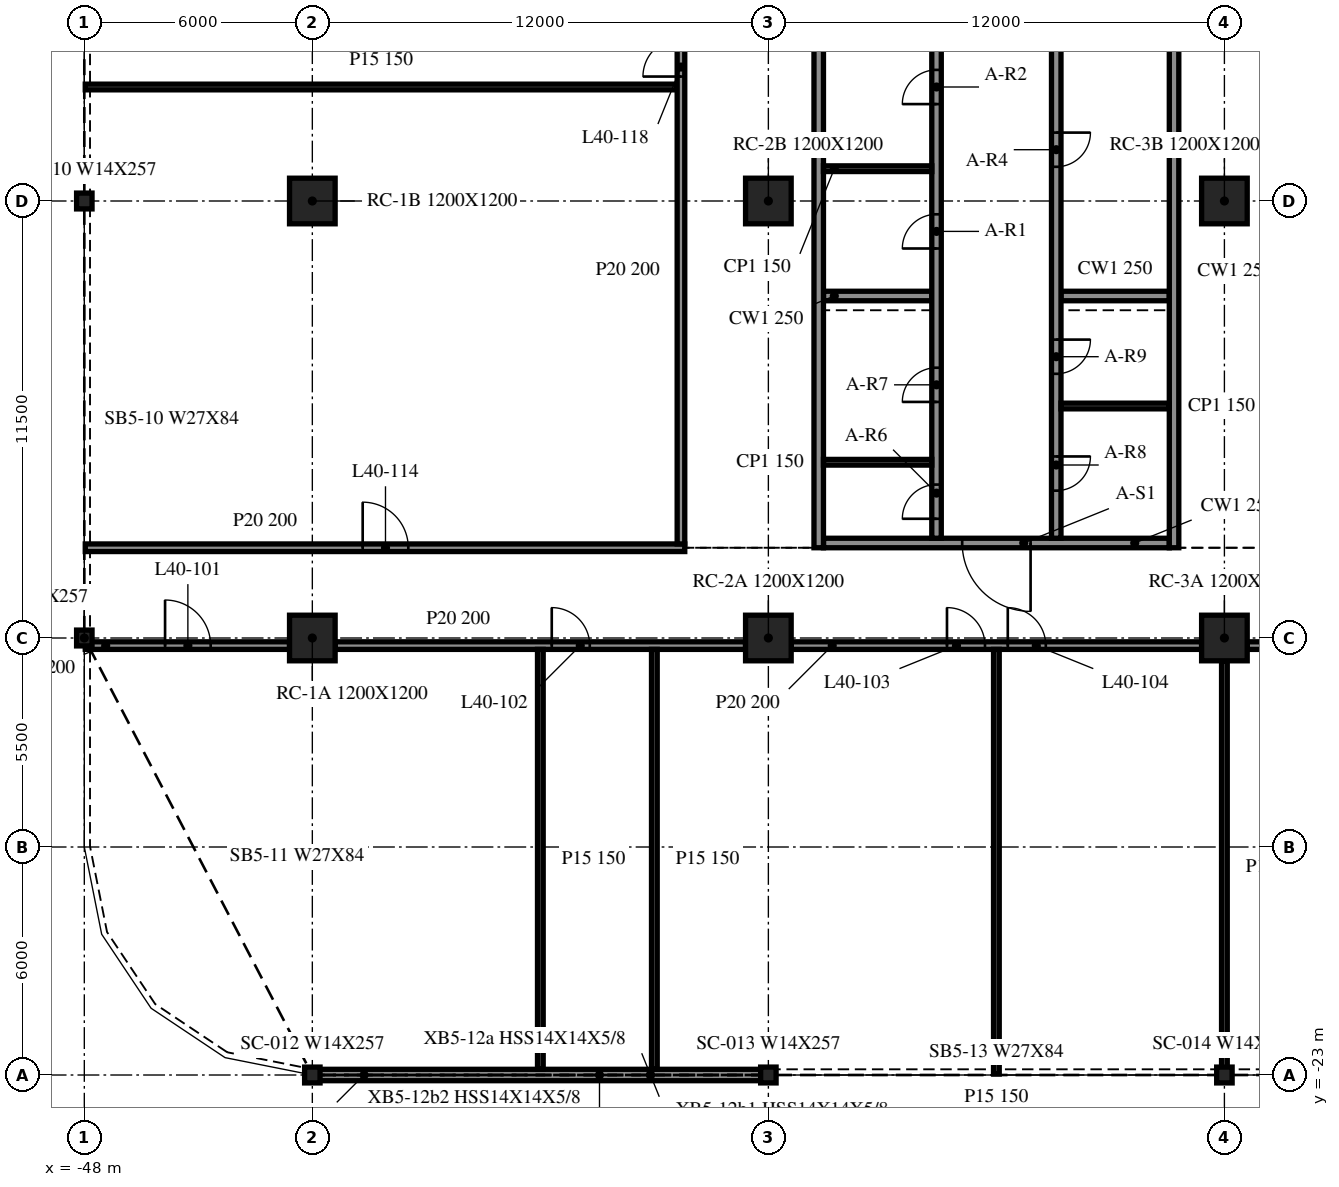
"""IFC4 building model, lengths in metres.
Left out: names, types, materials, properties, quantities, classifications, styles, units other than length and angle.
Written with IfcOpenShell. Run it as: python <this file> out.ifc"""

import sys

from ifc_helpers import new_model, si_unit, direction, frame, frame_2d, origin, origin_2d, place, context, subcontext, project, spatial, rectangle, i_section, extrude, element, fill, save


model = new_model("IFC4")
c1 = context("Model", 3, precision=1e-05, world=origin(), true_north=direction((0.0, 1.0)))
c2 = subcontext(c1, "Body", "Model", "MODEL_VIEW")
j1 = project(units=[si_unit("LENGTHUNIT", "METRE"), si_unit("PLANEANGLEUNIT", "RADIAN")], contexts=[c1])
p1 = place(None, origin())
s1 = spatial("IfcSite", under=j1, at=p1, CompositionType="ELEMENT")
p2 = place(p1, origin())
s2 = spatial("IfcBuilding", under=s1, at=p2, CompositionType="ELEMENT")
p3 = place(p2, frame((0.0, 0.0, 170.6)))
s3 = spatial("IfcBuildingStorey", under=s2, at=p3, CompositionType="ELEMENT", Elevation=170.6)
for number, where, z_axis, x_axis in (
    (1, (-42.0, -11.5, -0.34), (0.0, 0.0, 1.0), (1.0, 0.0, 0.0)),
    (2, (-42.0, 0.0, -0.34), (0.0, 0.0, 1.0), (1.0, 0.0, 0.0)),
    (3, (-30.0, -11.5, -0.34), (0.0, 0.0, 1.0), (1.0, 0.0, 0.0)),
    (4, (-30.0, 0.0, -0.34), (0.0, 0.0, 1.0), (1.0, 0.0, 0.0)),
    (5, (-18.0, -11.5, -0.34), (0.0, 0.0, 1.0), (1.0, 0.0, 0.0)),
    (6, (-18.0, 0.0, -0.34), (0.0, 0.0, 1.0), (1.0, 0.0, 0.0)),
):
    element("IfcColumn", number, at=place(p3, frame(where, z_axis=z_axis, x_axis=x_axis)), inside=s3, PredefinedType="COLUMN", context=c2, shape_type="SweptSolid", body=[
        extrude(rectangle(XDim=1.2, YDim=1.2, at=origin_2d()), origin(), (0.0, 0.0, 1.0), 3.8),
    ])
for number, where, z_axis, x_axis in (
    (7, (-48.0, 0.0, -0.34), (0.0, 0.0, 1.0), (1.0, 0.0, 0.0)),
    (8, (-48.0, -11.5, -0.34), (0.0, 0.0, 1.0), (1.0, 0.0, 0.0)),
    (9, (-42.0, -23.0, -0.34), (0.0, 0.0, 1.0), (1.0, 0.0, 0.0)),
    (10, (-30.0, -23.0, -0.34), (0.0, 0.0, 1.0), (1.0, 0.0, 0.0)),
    (11, (-18.0, -23.0, -0.34), (0.0, 0.0, 1.0), (1.0, 0.0, 0.0)),
):
    element("IfcColumn", number, at=place(p3, frame(where, z_axis=z_axis, x_axis=x_axis)), inside=s3, PredefinedType="COLUMN", context=c2, shape_type="SweptSolid", body=[
        extrude(i_section(OverallWidth=0.406, OverallDepth=0.417, WebThickness=0.03, FlangeThickness=0.048, at=origin_2d()), origin(), (0.0, 0.0, 1.0), 3.8),
    ])
p4 = place(p3, frame((-41.985, -23.0, 0.0), z_axis=(0.0, 0.0, 1.0), x_axis=(1.0, 0.0, 0.0)))
e12 = element("IfcWall", 12, at=p4, inside=s3, PredefinedType="NOTDEFINED", context=c2, shape_type="SweptSolid", body=[
    extrude(rectangle(XDim=11.97, YDim=0.3, at=frame_2d((5.985, 0.0))), origin(), (0.0, 0.0, 1.0), 2.782),
])
for number, where, z_axis, x_axis in (
    (13, (-28.675, 15.125, 0.0), (0.0, 0.0, 1.0), (0.0, -1.0, 0.0)),
    (14, (-19.325, -9.125, 0.0), (0.0, 0.0, 1.0), (0.0, 1.0, 0.0)),
):
    element("IfcWall", number, at=place(p3, frame(where, z_axis=z_axis, x_axis=x_axis)), inside=s3, PredefinedType="SOLIDWALL", context=c2, shape_type="SweptSolid", body=[
        extrude(rectangle(XDim=24.25, YDim=0.25, at=frame_2d((12.125, 0.0))), origin(), (0.0, 0.0, 1.0), 3.46),
    ])
p5 = place(p3, frame((-19.45, -9.0, 0.0), z_axis=(0.0, 0.0, 1.0), x_axis=(-1.0, 0.0, 0.0)))
e15 = element("IfcWall", 15, at=p5, inside=s3, PredefinedType="SOLIDWALL", context=c2, shape_type="SweptSolid", body=[
    extrude(rectangle(XDim=9.1, YDim=0.25, at=frame_2d((4.55, 0.0))), origin(), (0.0, 0.0, 1.0), 3.46),
])
p6 = place(p5, frame((3.65, 0.0, 0.0)))
e16 = element("IfcOpeningElement", 16, at=p6, cuts=e15, PredefinedType="OPENING", context=c2, shape_type="SweptSolid", body=[
    extrude(rectangle(XDim=1.8, YDim=2.1, at=frame_2d((0.9, 1.05))), frame((0.0, 0.135, 0.0), z_axis=(0.0, -1.0, 0.0), x_axis=(1.0, 0.0, 0.0)), (0.0, 0.0, 1.0), 0.27),
])
p7 = place(p3, frame((-25.575, -8.875, 0.0), z_axis=(0.0, 0.0, 1.0), x_axis=(0.0, 1.0, 0.0)))
e17 = element("IfcWall", 17, at=p7, inside=s3, PredefinedType="SOLIDWALL", context=c2, shape_type="SweptSolid", body=[
    extrude(rectangle(XDim=17.5, YDim=0.25, at=frame_2d((8.75, 0.0))), origin(), (0.0, 0.0, 1.0), 3.46),
])
p8 = place(p7, frame((7.625, 0.0, 0.0)))
e18 = element("IfcOpeningElement", 18, at=p8, cuts=e17, PredefinedType="OPENING", context=c2, shape_type="SweptSolid", body=[
    extrude(rectangle(XDim=0.9, YDim=2.1, at=frame_2d((0.45, 1.05))), frame((0.0, 0.135, 0.0), z_axis=(0.0, -1.0, 0.0), x_axis=(1.0, 0.0, 0.0)), (0.0, 0.0, 1.0), 0.27),
])
p9 = place(p7, frame((11.425, 0.0, 0.0)))
e19 = element("IfcOpeningElement", 19, at=p9, cuts=e17, PredefinedType="OPENING", context=c2, shape_type="SweptSolid", body=[
    extrude(rectangle(XDim=0.9, YDim=2.1, at=frame_2d((0.45, 1.05))), frame((0.0, 0.135, 0.0), z_axis=(0.0, -1.0, 0.0), x_axis=(1.0, 0.0, 0.0)), (0.0, 0.0, 1.0), 0.27),
])
p10 = place(p7, frame((15.225, 0.0, 0.0)))
e20 = element("IfcOpeningElement", 20, at=p10, cuts=e17, PredefinedType="OPENING", context=c2, shape_type="SweptSolid", body=[
    extrude(rectangle(XDim=0.9, YDim=2.1, at=frame_2d((0.45, 1.05))), frame((0.0, 0.135, 0.0), z_axis=(0.0, -1.0, 0.0), x_axis=(1.0, 0.0, 0.0)), (0.0, 0.0, 1.0), 0.27),
])
p11 = place(p7, frame((0.512, 0.0, 0.0)))
e21 = element("IfcOpeningElement", 21, at=p11, cuts=e17, PredefinedType="OPENING", context=c2, shape_type="SweptSolid", body=[
    extrude(rectangle(XDim=0.9, YDim=2.1, at=frame_2d((0.45, 1.05))), frame((0.0, 0.135, 0.0), z_axis=(0.0, -1.0, 0.0), x_axis=(1.0, 0.0, 0.0)), (0.0, 0.0, 1.0), 0.27),
])
p12 = place(p7, frame((3.587, 0.0, 0.0)))
e22 = element("IfcOpeningElement", 22, at=p12, cuts=e17, PredefinedType="OPENING", context=c2, shape_type="SweptSolid", body=[
    extrude(rectangle(XDim=0.9, YDim=2.1, at=frame_2d((0.45, 1.05))), frame((0.0, 0.135, 0.0), z_axis=(0.0, -1.0, 0.0), x_axis=(1.0, 0.0, 0.0)), (0.0, 0.0, 1.0), 0.27),
])
p13 = place(p3, frame((-22.425, 14.875, 0.0), z_axis=(0.0, 0.0, 1.0), x_axis=(0.0, -1.0, 0.0)))
e23 = element("IfcWall", 23, at=p13, inside=s3, PredefinedType="SOLIDWALL", context=c2, shape_type="SweptSolid", body=[
    extrude(rectangle(XDim=23.75, YDim=0.25, at=frame_2d((11.875, 0.0))), origin(), (0.0, 0.0, 1.0), 3.46),
])
p14 = place(p13, frame((13.075, 0.0, 0.0)))
e24 = element("IfcOpeningElement", 24, at=p14, cuts=e23, PredefinedType="OPENING", context=c2, shape_type="SweptSolid", body=[
    extrude(rectangle(XDim=0.9, YDim=2.1, at=frame_2d((0.45, 1.05))), frame((0.0, 0.135, 0.0), z_axis=(0.0, -1.0, 0.0), x_axis=(1.0, 0.0, 0.0)), (0.0, 0.0, 1.0), 0.27),
])
p15 = place(p13, frame((7.625, 0.0, 0.0)))
e25 = element("IfcOpeningElement", 25, at=p15, cuts=e23, PredefinedType="OPENING", context=c2, shape_type="SweptSolid", body=[
    extrude(rectangle(XDim=0.9, YDim=2.1, at=frame_2d((0.45, 1.05))), frame((0.0, 0.135, 0.0), z_axis=(0.0, -1.0, 0.0), x_axis=(1.0, 0.0, 0.0)), (0.0, 0.0, 1.0), 0.27),
])
p16 = place(p13, frame((21.597, 0.0, 0.0)))
e26 = element("IfcOpeningElement", 26, at=p16, cuts=e23, PredefinedType="OPENING", context=c2, shape_type="SweptSolid", body=[
    extrude(rectangle(XDim=0.9, YDim=2.1, at=frame_2d((0.45, 1.05))), frame((0.0, 0.135, 0.0), z_axis=(0.0, -1.0, 0.0), x_axis=(1.0, 0.0, 0.0)), (0.0, 0.0, 1.0), 0.27),
])
p17 = place(p13, frame((18.522, 0.0, 0.0)))
e27 = element("IfcOpeningElement", 27, at=p17, cuts=e23, PredefinedType="OPENING", context=c2, shape_type="SweptSolid", body=[
    extrude(rectangle(XDim=0.9, YDim=2.1, at=frame_2d((0.45, 1.05))), frame((0.0, 0.135, 0.0), z_axis=(0.0, -1.0, 0.0), x_axis=(1.0, 0.0, 0.0)), (0.0, 0.0, 1.0), 0.27),
])
p18 = place(p13, frame((4.087, 0.0, 0.0)))
e28 = element("IfcOpeningElement", 28, at=p18, cuts=e23, PredefinedType="OPENING", context=c2, shape_type="SweptSolid", body=[
    extrude(rectangle(XDim=0.9, YDim=2.1, at=frame_2d((0.45, 1.05))), frame((0.0, 0.135, 0.0), z_axis=(0.0, -1.0, 0.0), x_axis=(1.0, 0.0, 0.0)), (0.0, 0.0, 1.0), 0.27),
])
p19 = place(p13, frame((1.012, 0.0, 0.0)))
e29 = element("IfcOpeningElement", 29, at=p19, cuts=e23, PredefinedType="OPENING", context=c2, shape_type="SweptSolid", body=[
    extrude(rectangle(XDim=0.9, YDim=2.1, at=frame_2d((0.45, 1.05))), frame((0.0, 0.135, 0.0), z_axis=(0.0, -1.0, 0.0), x_axis=(1.0, 0.0, 0.0)), (0.0, 0.0, 1.0), 0.27),
])
for number, where, z_axis, x_axis in (
    (30, (-28.55, -2.5, 0.0), (0.0, 0.0, 1.0), (1.0, 0.0, 0.0)),
    (31, (-22.3, -2.5, 0.0), (0.0, 0.0, 1.0), (1.0, 0.0, 0.0)),
):
    element("IfcWall", number, at=place(p3, frame(where, z_axis=z_axis, x_axis=x_axis)), inside=s3, PredefinedType="SOLIDWALL", context=c2, shape_type="SweptSolid", body=[
        extrude(rectangle(XDim=2.85, YDim=0.25, at=frame_2d((1.425, 0.0))), origin(), (0.0, 0.0, 1.0), 3.46),
    ])
for number, where, z_axis, x_axis in (
    (32, (-28.55, 0.85, 0.0), (0.0, 0.0, 1.0), (1.0, 0.0, 0.0)),
    (33, (-28.55, -6.875, 0.0), (0.0, 0.0, 1.0), (1.0, 0.0, 0.0)),
    (34, (-22.3, -5.395, 0.0), (0.0, 0.0, 1.0), (1.0, 0.0, 0.0)),
):
    element("IfcWall", number, at=place(p3, frame(where, z_axis=z_axis, x_axis=x_axis)), inside=s3, PredefinedType="PARTITIONING", context=c2, shape_type="SweptSolid", body=[
        extrude(rectangle(XDim=2.85, YDim=0.15, at=frame_2d((1.425, 0.0))), origin(), (0.0, 0.0, 1.0), 3.46),
    ])
p20 = place(p3, frame((-47.975, -11.7, 0.0), z_axis=(0.0, 0.0, 1.0), x_axis=(1.0, 0.0, 0.0)))
e35 = element("IfcWall", 35, at=p20, inside=s3, PredefinedType="PARTITIONING", context=c2, shape_type="SweptSolid", body=[
    extrude(rectangle(XDim=5.375, YDim=0.2, at=frame_2d((2.688, 0.0))), origin(), (0.0, 0.0, 1.0), 3.46),
])
p21 = place(p20, frame((2.1, 0.0, 0.0)))
e36 = element("IfcOpeningElement", 36, at=p21, cuts=e35, PredefinedType="OPENING", context=c2, shape_type="SweptSolid", body=[
    extrude(rectangle(XDim=1.2, YDim=2.1, at=frame_2d((0.6, 1.05))), frame((0.0, 0.11, 0.0), z_axis=(0.0, -1.0, 0.0), x_axis=(1.0, 0.0, 0.0)), (0.0, 0.0, 1.0), 0.22),
])
p22 = place(p3, frame((-41.4, -11.7, 0.0), z_axis=(0.0, 0.0, 1.0), x_axis=(1.0, 0.0, 0.0)))
e37 = element("IfcWall", 37, at=p22, inside=s3, PredefinedType="PARTITIONING", context=c2, shape_type="SweptSolid", body=[
    extrude(rectangle(XDim=10.8, YDim=0.2, at=frame_2d((5.4, 0.0))), origin(), (0.0, 0.0, 1.0), 3.46),
])
p23 = place(p22, frame((5.7, 0.0, 0.0)))
e38 = element("IfcOpeningElement", 38, at=p23, cuts=e37, PredefinedType="OPENING", context=c2, shape_type="SweptSolid", body=[
    extrude(rectangle(XDim=1.0, YDim=2.1, at=frame_2d((0.5, 1.05))), frame((0.0, 0.11, 0.0), z_axis=(0.0, -1.0, 0.0), x_axis=(1.0, 0.0, 0.0)), (0.0, 0.0, 1.0), 0.22),
])
p24 = place(p3, frame((-29.4, -11.7, 0.0), z_axis=(0.0, 0.0, 1.0), x_axis=(1.0, 0.0, 0.0)))
e39 = element("IfcWall", 39, at=p24, inside=s3, PredefinedType="PARTITIONING", context=c2, shape_type="SweptSolid", body=[
    extrude(rectangle(XDim=10.8, YDim=0.2, at=frame_2d((5.4, 0.0))), origin(), (0.0, 0.0, 1.0), 3.46),
])
p25 = place(p24, frame((4.1, 0.0, 0.0)))
e40 = element("IfcOpeningElement", 40, at=p25, cuts=e39, PredefinedType="OPENING", context=c2, shape_type="SweptSolid", body=[
    extrude(rectangle(XDim=1.0, YDim=2.1, at=frame_2d((0.5, 1.05))), frame((0.0, 0.11, 0.0), z_axis=(0.0, -1.0, 0.0), x_axis=(1.0, 0.0, 0.0)), (0.0, 0.0, 1.0), 0.22),
])
p26 = place(p24, frame((5.7, 0.0, 0.0)))
e41 = element("IfcOpeningElement", 41, at=p26, cuts=e39, PredefinedType="OPENING", context=c2, shape_type="SweptSolid", body=[
    extrude(rectangle(XDim=1.0, YDim=2.1, at=frame_2d((0.5, 1.05))), frame((0.0, 0.11, 0.0), z_axis=(0.0, -1.0, 0.0), x_axis=(1.0, 0.0, 0.0)), (0.0, 0.0, 1.0), 0.22),
])
p27 = place(p3, frame((-17.4, -11.7, 0.0), z_axis=(0.0, 0.0, 1.0), x_axis=(1.0, 0.0, 0.0)))
e42 = element("IfcWall", 42, at=p27, inside=s3, PredefinedType="PARTITIONING", context=c2, shape_type="SweptSolid", body=[
    extrude(rectangle(XDim=10.8, YDim=0.2, at=frame_2d((5.4, 0.0))), origin(), (0.0, 0.0, 1.0), 3.46),
])
p28 = place(p27, frame((4.7, 0.0, 0.0)))
e43 = element("IfcOpeningElement", 43, at=p28, cuts=e42, PredefinedType="OPENING", context=c2, shape_type="SweptSolid", body=[
    extrude(rectangle(XDim=1.2, YDim=2.1, at=frame_2d((0.6, 1.05))), frame((0.0, 0.11, 0.0), z_axis=(0.0, -1.0, 0.0), x_axis=(1.0, 0.0, 0.0)), (0.0, 0.0, 1.0), 0.22),
])
p29 = place(p3, frame((-47.975, -9.125, 0.0), z_axis=(0.0, 0.0, 1.0), x_axis=(1.0, 0.0, 0.0)))
e44 = element("IfcWall", 44, at=p29, inside=s3, PredefinedType="PARTITIONING", context=c2, shape_type="SweptSolid", body=[
    extrude(rectangle(XDim=15.775, YDim=0.2, at=frame_2d((7.888, 0.0))), origin(), (0.0, 0.0, 1.0), 3.46),
])
p30 = place(p29, frame((7.3, 0.0, 0.0)))
e45 = element("IfcOpeningElement", 45, at=p30, cuts=e44, PredefinedType="OPENING", context=c2, shape_type="SweptSolid", body=[
    extrude(rectangle(XDim=1.2, YDim=2.1, at=frame_2d((0.6, 1.05))), frame((0.0, 0.11, 0.0), z_axis=(0.0, -1.0, 0.0), x_axis=(1.0, 0.0, 0.0)), (0.0, 0.0, 1.0), 0.22),
])
p31 = place(p3, frame((-47.975, 3.0, 0.0), z_axis=(0.0, 0.0, 1.0), x_axis=(1.0, 0.0, 0.0)))
e46 = element("IfcWall", 46, at=p31, inside=s3, PredefinedType="PARTITIONING", context=c2, shape_type="SweptSolid", body=[
    extrude(rectangle(XDim=15.575, YDim=0.15, at=frame_2d((7.788, 0.0))), origin(), (0.0, 0.0, 1.0), 3.46),
])
for number, where, z_axis, x_axis in (
    (47, (-36.0, -22.85, 0.0), (0.0, 0.0, 1.0), (0.0, 1.0, 0.0)),
    (48, (-33.0, -22.85, 0.0), (0.0, 0.0, 1.0), (0.0, 1.0, 0.0)),
):
    element("IfcWall", number, at=place(p3, frame(where, z_axis=z_axis, x_axis=x_axis)), inside=s3, PredefinedType="PARTITIONING", context=c2, shape_type="SweptSolid", body=[
        extrude(rectangle(XDim=11.05, YDim=0.15, at=frame_2d((5.525, 0.0))), origin(), (0.0, 0.0, 1.0), 3.46),
    ])
p32 = place(p3, frame((-32.3, -9.025, 0.0), z_axis=(0.0, 0.0, 1.0), x_axis=(0.0, 1.0, 0.0)))
e49 = element("IfcWall", 49, at=p32, inside=s3, PredefinedType="PARTITIONING", context=c2, shape_type="SweptSolid", body=[
    extrude(rectangle(XDim=24.05, YDim=0.2, at=frame_2d((12.025, 0.0))), origin(), (0.0, 0.0, 1.0), 3.46),
])
p33 = place(p32, frame((12.3, 0.0, 0.0)))
e50 = element("IfcOpeningElement", 50, at=p33, cuts=e49, PredefinedType="OPENING", context=c2, shape_type="SweptSolid", body=[
    extrude(rectangle(XDim=1.0, YDim=2.1, at=frame_2d((0.5, 1.05))), frame((0.0, 0.11, 0.0), z_axis=(0.0, -1.0, 0.0), x_axis=(1.0, 0.0, 0.0)), (0.0, 0.0, 1.0), 0.22),
])
p34 = place(p3, frame((-24.0, -22.975, 0.0), z_axis=(0.0, 0.0, 1.0), x_axis=(0.0, 1.0, 0.0)))
e51 = element("IfcWall", 51, at=p34, inside=s3, PredefinedType="PARTITIONING", context=c2, shape_type="SweptSolid", body=[
    extrude(rectangle(XDim=11.175, YDim=0.15, at=frame_2d((5.587, 0.0))), origin(), (0.0, 0.0, 1.0), 3.46),
])
p35 = place(p3, frame((-18.0, -22.975, 0.0), z_axis=(0.0, 0.0, 1.0), x_axis=(0.0, 1.0, 0.0)))
e52 = element("IfcWall", 52, at=p35, inside=s3, PredefinedType="PARTITIONING", context=c2, shape_type="SweptSolid", body=[
    extrude(rectangle(XDim=10.875, YDim=0.15, at=frame_2d((5.438, 0.0))), origin(), (0.0, 0.0, 1.0), 3.46),
])
p36 = place(p6, origin())
e53 = element("IfcDoor", 53, at=p36, inside=s3, OperationType="DOUBLE_DOOR_SINGLE_SWING", PredefinedType="DOOR", context=c2, shape_type="SweptSolid", body=[
    extrude(rectangle(XDim=1.8, YDim=2.1, at=frame_2d((0.9, 1.05))), frame((0.0, 0.025, 0.0), z_axis=(0.0, -1.0, 0.0), x_axis=(1.0, 0.0, 0.0)), (0.0, 0.0, 1.0), 0.05),
])
fill(e16, e53)
p37 = place(p8, origin())
e54 = element("IfcDoor", 54, at=p37, inside=s3, OperationType="SINGLE_SWING_LEFT", PredefinedType="DOOR", context=c2, shape_type="SweptSolid", body=[
    extrude(rectangle(XDim=0.9, YDim=2.1, at=frame_2d((0.45, 1.05))), frame((0.0, 0.025, 0.0), z_axis=(0.0, -1.0, 0.0), x_axis=(1.0, 0.0, 0.0)), (0.0, 0.0, 1.0), 0.05),
])
fill(e18, e54)
p38 = place(p9, origin())
e55 = element("IfcDoor", 55, at=p38, inside=s3, OperationType="SINGLE_SWING_RIGHT", PredefinedType="DOOR", context=c2, shape_type="SweptSolid", body=[
    extrude(rectangle(XDim=0.9, YDim=2.1, at=frame_2d((0.45, 1.05))), frame((0.0, 0.025, 0.0), z_axis=(0.0, -1.0, 0.0), x_axis=(1.0, 0.0, 0.0)), (0.0, 0.0, 1.0), 0.05),
])
fill(e19, e55)
p39 = place(p14, origin())
e56 = element("IfcDoor", 56, at=p39, inside=s3, OperationType="SINGLE_SWING_RIGHT", PredefinedType="DOOR", context=c2, shape_type="SweptSolid", body=[
    extrude(rectangle(XDim=0.9, YDim=2.1, at=frame_2d((0.45, 1.05))), frame((0.0, 0.025, 0.0), z_axis=(0.0, -1.0, 0.0), x_axis=(1.0, 0.0, 0.0)), (0.0, 0.0, 1.0), 0.05),
])
fill(e24, e56)
p40 = place(p11, origin())
e57 = element("IfcDoor", 57, at=p40, inside=s3, OperationType="SINGLE_SWING_RIGHT", PredefinedType="DOOR", context=c2, shape_type="SweptSolid", body=[
    extrude(rectangle(XDim=0.9, YDim=2.1, at=frame_2d((0.45, 1.05))), frame((0.0, 0.025, 0.0), z_axis=(0.0, -1.0, 0.0), x_axis=(1.0, 0.0, 0.0)), (0.0, 0.0, 1.0), 0.05),
])
fill(e21, e57)
p41 = place(p12, origin())
e58 = element("IfcDoor", 58, at=p41, inside=s3, OperationType="SINGLE_SWING_LEFT", PredefinedType="DOOR", context=c2, shape_type="SweptSolid", body=[
    extrude(rectangle(XDim=0.9, YDim=2.1, at=frame_2d((0.45, 1.05))), frame((0.0, 0.025, 0.0), z_axis=(0.0, -1.0, 0.0), x_axis=(1.0, 0.0, 0.0)), (0.0, 0.0, 1.0), 0.05),
])
fill(e22, e58)
p42 = place(p16, origin())
e59 = element("IfcDoor", 59, at=p42, inside=s3, OperationType="SINGLE_SWING_RIGHT", PredefinedType="DOOR", context=c2, shape_type="SweptSolid", body=[
    extrude(rectangle(XDim=0.9, YDim=2.1, at=frame_2d((0.45, 1.05))), frame((0.0, 0.025, 0.0), z_axis=(0.0, -1.0, 0.0), x_axis=(1.0, 0.0, 0.0)), (0.0, 0.0, 1.0), 0.05),
])
fill(e26, e59)
p43 = place(p17, origin())
e60 = element("IfcDoor", 60, at=p43, inside=s3, OperationType="SINGLE_SWING_LEFT", PredefinedType="DOOR", context=c2, shape_type="SweptSolid", body=[
    extrude(rectangle(XDim=0.9, YDim=2.1, at=frame_2d((0.45, 1.05))), frame((0.0, 0.025, 0.0), z_axis=(0.0, -1.0, 0.0), x_axis=(1.0, 0.0, 0.0)), (0.0, 0.0, 1.0), 0.05),
])
fill(e27, e60)
p44 = place(p21, origin())
e61 = element("IfcDoor", 61, at=p44, inside=s3, OperationType="SINGLE_SWING_LEFT", PredefinedType="DOOR", context=c2, shape_type="SweptSolid", body=[
    extrude(rectangle(XDim=1.2, YDim=2.1, at=frame_2d((0.6, 1.05))), frame((0.0, 0.025, 0.0), z_axis=(0.0, -1.0, 0.0), x_axis=(1.0, 0.0, 0.0)), (0.0, 0.0, 1.0), 0.05),
])
fill(e36, e61)
p45 = place(p23, origin())
e62 = element("IfcDoor", 62, at=p45, inside=s3, OperationType="SINGLE_SWING_LEFT", PredefinedType="DOOR", context=c2, shape_type="SweptSolid", body=[
    extrude(rectangle(XDim=1.0, YDim=2.1, at=frame_2d((0.5, 1.05))), frame((0.0, 0.025, 0.0), z_axis=(0.0, -1.0, 0.0), x_axis=(1.0, 0.0, 0.0)), (0.0, 0.0, 1.0), 0.05),
])
fill(e38, e62)
p46 = place(p25, origin())
e63 = element("IfcDoor", 63, at=p46, inside=s3, OperationType="SINGLE_SWING_RIGHT", PredefinedType="DOOR", context=c2, shape_type="SweptSolid", body=[
    extrude(rectangle(XDim=1.0, YDim=2.1, at=frame_2d((0.5, 1.05))), frame((0.0, 0.025, 0.0), z_axis=(0.0, -1.0, 0.0), x_axis=(1.0, 0.0, 0.0)), (0.0, 0.0, 1.0), 0.05),
])
fill(e40, e63)
p47 = place(p26, origin())
e64 = element("IfcDoor", 64, at=p47, inside=s3, OperationType="SINGLE_SWING_LEFT", PredefinedType="DOOR", context=c2, shape_type="SweptSolid", body=[
    extrude(rectangle(XDim=1.0, YDim=2.1, at=frame_2d((0.5, 1.05))), frame((0.0, 0.025, 0.0), z_axis=(0.0, -1.0, 0.0), x_axis=(1.0, 0.0, 0.0)), (0.0, 0.0, 1.0), 0.05),
])
fill(e41, e64)
p48 = place(p30, origin())
e65 = element("IfcDoor", 65, at=p48, inside=s3, OperationType="SINGLE_SWING_RIGHT", PredefinedType="DOOR", context=c2, shape_type="SweptSolid", body=[
    extrude(rectangle(XDim=1.2, YDim=2.1, at=frame_2d((0.6, 1.05))), frame((0.0, 0.025, 0.0), z_axis=(0.0, -1.0, 0.0), x_axis=(1.0, 0.0, 0.0)), (0.0, 0.0, 1.0), 0.05),
])
fill(e45, e65)
p49 = place(p33, origin())
e66 = element("IfcDoor", 66, at=p49, inside=s3, OperationType="SINGLE_SWING_RIGHT", PredefinedType="DOOR", context=c2, shape_type="SweptSolid", body=[
    extrude(rectangle(XDim=1.0, YDim=2.1, at=frame_2d((0.5, 1.05))), frame((0.0, 0.025, 0.0), z_axis=(0.0, -1.0, 0.0), x_axis=(1.0, 0.0, 0.0)), (0.0, 0.0, 1.0), 0.05),
])
fill(e50, e66)
save(model, sys.argv[1])
